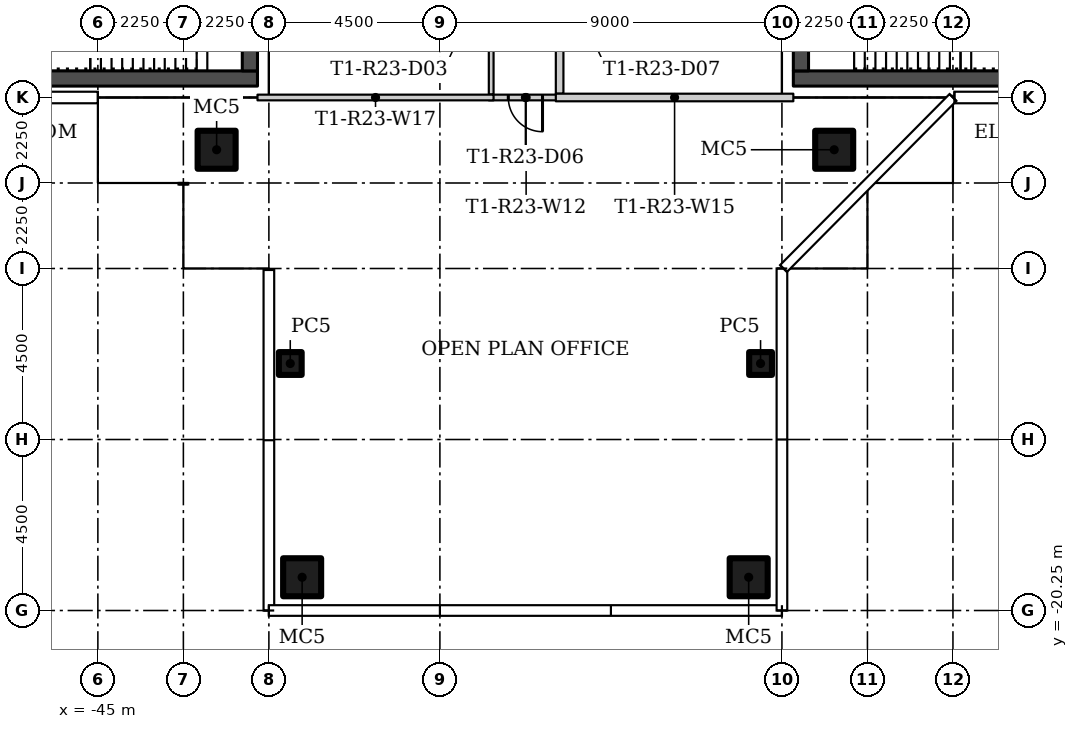
"""IFC4 building model, lengths in metres.
Left out: names, types, materials, properties, quantities, classifications, styles, units other than length and angle.
Written with IfcOpenShell. Run it as: python <this file> out.ifc"""

import sys

from ifc_helpers import new_model, si_unit, direction, frame, frame_2d, origin, origin_2d, place, context, subcontext, project, spatial, rectangle, hollow_rectangle, extrude, element, fill, save


model = new_model("IFC4")
c1 = context("Model", 3, precision=1e-05, world=origin(), true_north=direction((0.0, 1.0)))
c2 = subcontext(c1, "Body", "Model", "MODEL_VIEW")
j1 = project(units=[si_unit("LENGTHUNIT", "METRE"), si_unit("PLANEANGLEUNIT", "RADIAN")], contexts=[c1])
p1 = place(None, origin())
s1 = spatial("IfcSite", under=j1, at=p1, CompositionType="ELEMENT")
p2 = place(p1, origin())
s2 = spatial("IfcBuilding", under=s1, at=p2, CompositionType="ELEMENT")
p3 = place(p2, frame((0.0, 0.0, 210.0)))
s3 = spatial("IfcBuildingStorey", under=s2, at=p3, CompositionType="ELEMENT", Elevation=210.0)
for number, where in (
    (1, (-25.625, -8.125, 0.0)),
    (2, (-41.875, -8.125, 0.0)),
):
    element("IfcColumn", number, at=place(p3, frame(where)), inside=s3, PredefinedType="COLUMN", context=c2, shape_type="SweptSolid", body=[
        extrude(hollow_rectangle(XDim=1.0, YDim=1.0, WallThickness=0.04, at=origin_2d()), origin(), (0.0, 0.0, 1.0), 3.55),
    ])
p4 = place(p3, frame((-39.938, -13.75, 0.0)))
e3 = element("IfcColumn", 3, at=p4, inside=s3, PredefinedType="COLUMN", context=c2, shape_type="SweptSolid", body=[
    extrude(hollow_rectangle(XDim=0.6, YDim=0.6, WallThickness=0.02, at=origin_2d()), origin(), (0.0, 0.0, 1.0), 3.55),
])
p5 = place(p3, frame((-39.625, -19.375, 0.0)))
e4 = element("IfcColumn", 4, at=p5, inside=s3, PredefinedType="COLUMN", context=c2, shape_type="SweptSolid", body=[
    extrude(hollow_rectangle(XDim=1.0, YDim=1.0, WallThickness=0.04, at=origin_2d()), origin(), (0.0, 0.0, 1.0), 3.55),
])
p6 = place(p3, frame((-27.562, -13.75, 0.0)))
e5 = element("IfcColumn", 5, at=p6, inside=s3, PredefinedType="COLUMN", context=c2, shape_type="SweptSolid", body=[
    extrude(hollow_rectangle(XDim=0.6, YDim=0.6, WallThickness=0.02, at=origin_2d()), origin(), (0.0, 0.0, 1.0), 3.55),
])
p7 = place(p3, frame((-27.875, -19.375, 0.0)))
e6 = element("IfcColumn", 6, at=p7, inside=s3, PredefinedType="COLUMN", context=c2, shape_type="SweptSolid", body=[
    extrude(hollow_rectangle(XDim=1.0, YDim=1.0, WallThickness=0.04, at=origin_2d()), origin(), (0.0, 0.0, 1.0), 3.55),
])
p8 = place(p3, frame((-32.85, -0.05, 0.0), z_axis=(0.0, 0.0, 1.0), x_axis=(0.0, -1.0, 0.0)))
e7 = element("IfcWall", 7, at=p8, inside=s3, PredefinedType="PARTITIONING", context=c2, shape_type="SweptSolid", body=[
    extrude(rectangle(XDim=6.6, YDim=0.2, at=frame_2d((3.3, 0.0))), origin(), (0.0, 0.0, 1.0), 3.55),
])
p9 = place(p8, frame((2.85, 0.0, 0.0)))
e8 = element("IfcOpeningElement", 8, at=p9, cuts=e7, PredefinedType="OPENING", context=c2, shape_type="SweptSolid", body=[
    extrude(rectangle(XDim=0.9, YDim=2.1, at=frame_2d((0.45, 1.05))), frame((0.0, 0.11, 0.0), z_axis=(0.0, -1.0, 0.0), x_axis=(1.0, 0.0, 0.0)), (0.0, 0.0, 1.0), 0.22),
])
p10 = place(p3, frame((-34.65, -6.675, 0.0), z_axis=(0.0, 0.0, 1.0), x_axis=(0.0, 1.0, 0.0)))
e9 = element("IfcWall", 9, at=p10, inside=s3, PredefinedType="PARTITIONING", context=c2, shape_type="SweptSolid", body=[
    extrude(rectangle(XDim=6.662, YDim=0.125, at=frame_2d((3.331, 0.0))), origin(), (0.0, 0.0, 1.0), 3.55),
])
p11 = place(p10, frame((2.875, 0.0, 0.0)))
e10 = element("IfcOpeningElement", 10, at=p11, cuts=e9, PredefinedType="OPENING", context=c2, shape_type="SweptSolid", body=[
    extrude(rectangle(XDim=0.9, YDim=2.1, at=frame_2d((0.45, 1.05))), frame((0.0, 0.073, 0.0), z_axis=(0.0, -1.0, 0.0), x_axis=(1.0, 0.0, 0.0)), (0.0, 0.0, 1.0), 0.145),
])
p12 = place(p3, frame((-32.75, -6.75, 0.0), z_axis=(0.0, 0.0, 1.0), x_axis=(-1.0, 0.0, 0.0)))
e11 = element("IfcWall", 11, at=p12, inside=s3, PredefinedType="PARTITIONING", context=c2, shape_type="SweptSolid", body=[
    extrude(rectangle(XDim=1.963, YDim=0.15, at=frame_2d((0.982, 0.0))), origin(), (0.0, 0.0, 1.0), 3.55),
])
p13 = place(p12, frame((0.55, 0.0, 0.0)))
e12 = element("IfcOpeningElement", 12, at=p13, cuts=e11, PredefinedType="OPENING", context=c2, shape_type="SweptSolid", body=[
    extrude(rectangle(XDim=0.9, YDim=2.1, at=frame_2d((0.45, 1.05))), frame((0.0, 0.085, 0.0), z_axis=(0.0, -1.0, 0.0), x_axis=(1.0, 0.0, 0.0)), (0.0, 0.0, 1.0), 0.17),
])
p14 = place(p3, frame((-32.95, -6.75, 0.0)))
e13 = element("IfcWall", 13, at=p14, inside=s3, PredefinedType="PARTITIONING", context=c2, shape_type="SweptSolid", body=[
    extrude(rectangle(XDim=6.25, YDim=0.2, at=frame_2d((3.125, 0.0))), origin(), (0.0, 0.0, 1.0), 3.55),
])
p15 = place(p3, frame((-40.8, -6.75, 0.0)))
e14 = element("IfcWall", 14, at=p15, inside=s3, PredefinedType="PARTITIONING", context=c2, shape_type="SweptSolid", body=[
    extrude(rectangle(XDim=6.212, YDim=0.15, at=frame_2d((3.106, 0.0))), origin(), (0.0, 0.0, 1.0), 3.55),
])
p16 = place(p3, frame((-26.7, -6.25, 0.0)))
e15 = element("IfcWall", 15, at=p16, inside=s3, PredefinedType="SHEAR", context=c2, shape_type="SweptSolid", body=[
    extrude(rectangle(XDim=12.9, YDim=0.4, at=frame_2d((6.45, 0.0))), origin(), (0.0, 0.0, 1.0), 3.55),
])
p17 = place(p3, frame((-26.5, 6.05, 0.0), z_axis=(0.0, 0.0, 1.0), x_axis=(0.0, -1.0, 0.0)))
e16 = element("IfcWall", 16, at=p17, inside=s3, PredefinedType="SHEAR", context=c2, shape_type="SweptSolid", body=[
    extrude(rectangle(XDim=12.1, YDim=0.4, at=frame_2d((6.05, 0.0))), origin(), (0.0, 0.0, 1.0), 3.55),
])
p18 = place(p17, frame((3.9, 0.0, 0.0)))
e17 = element("IfcOpeningElement", 17, at=p18, cuts=e16, PredefinedType="OPENING", context=c2, shape_type="SweptSolid", body=[
    extrude(rectangle(XDim=1.8, YDim=2.4, at=frame_2d((0.9, 1.2))), frame((0.0, 0.21, 0.0), z_axis=(0.0, -1.0, 0.0), x_axis=(1.0, 0.0, 0.0)), (0.0, 0.0, 1.0), 0.42),
])
p19 = place(p3, frame((-40.8, -6.25, 0.0), z_axis=(0.0, 0.0, 1.0), x_axis=(-1.0, 0.0, 0.0)))
e18 = element("IfcWall", 18, at=p19, inside=s3, PredefinedType="SHEAR", context=c2, shape_type="SweptSolid", body=[
    extrude(rectangle(XDim=12.9, YDim=0.4, at=frame_2d((6.45, 0.0))), origin(), (0.0, 0.0, 1.0), 3.55),
])
p20 = place(p3, frame((-41.0, -6.05, 0.0), z_axis=(0.0, 0.0, 1.0), x_axis=(0.0, 1.0, 0.0)))
e19 = element("IfcWall", 19, at=p20, inside=s3, PredefinedType="SHEAR", context=c2, shape_type="SweptSolid", body=[
    extrude(rectangle(XDim=12.1, YDim=0.4, at=frame_2d((6.05, 0.0))), origin(), (0.0, 0.0, 1.0), 3.55),
])
p21 = place(p20, frame((6.4, 0.0, 0.0)))
e20 = element("IfcOpeningElement", 20, at=p21, cuts=e19, PredefinedType="OPENING", context=c2, shape_type="SweptSolid", body=[
    extrude(rectangle(XDim=1.8, YDim=2.4, at=frame_2d((0.9, 1.2))), frame((0.0, 0.21, 0.0), z_axis=(0.0, -1.0, 0.0), x_axis=(1.0, 0.0, 0.0)), (0.0, 0.0, 1.0), 0.42),
])
p22 = place(p13, origin())
e21 = element("IfcDoor", 21, at=p22, inside=s3, OperationType="SINGLE_SWING_LEFT", PredefinedType="DOOR", context=c2, shape_type="SweptSolid", body=[
    extrude(rectangle(XDim=0.9, YDim=2.1, at=frame_2d((0.45, 1.05))), frame((0.0, 0.025, 0.0), z_axis=(0.0, -1.0, 0.0), x_axis=(1.0, 0.0, 0.0)), (0.0, 0.0, 1.0), 0.05),
])
fill(e12, e21)
save(model, sys.argv[1])
